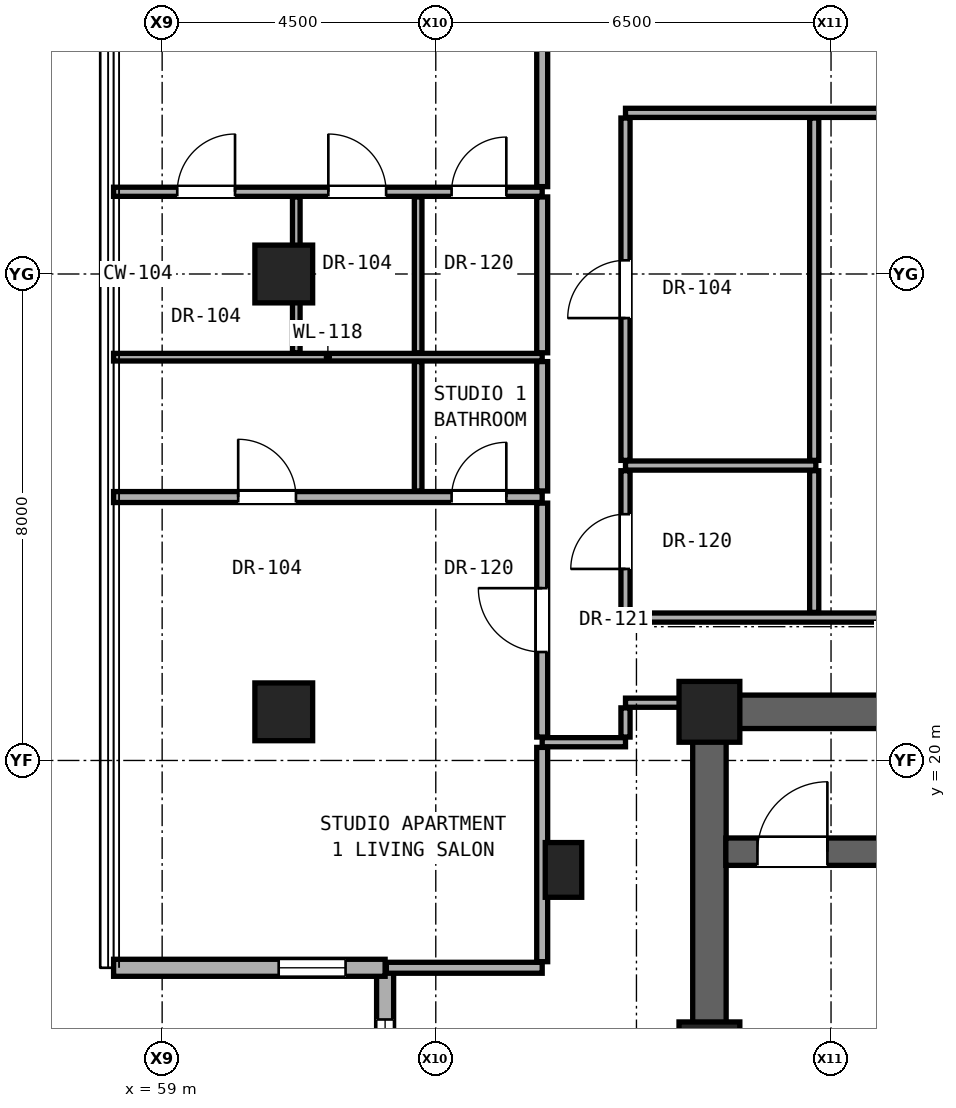
"""IFC4 building model, lengths in metres.
Left out: names, types, materials, properties, quantities, classifications, styles, units other than length and angle.
Written with IfcOpenShell. Run it as: python <this file> out.ifc"""

import sys

from ifc_helpers import new_model, si_unit, direction, frame, frame_2d, origin, origin_2d, place, context, subcontext, project, spatial, rectangle, hollow_rectangle, extrude, element, fill, save


model = new_model("IFC4")
c1 = context("Model", 3, precision=1e-05, world=origin(), true_north=direction((0.0, 1.0)))
c2 = subcontext(c1, "Body", "Model", "MODEL_VIEW")
j1 = project(units=[si_unit("LENGTHUNIT", "METRE"), si_unit("PLANEANGLEUNIT", "RADIAN")], contexts=[c1])
p1 = place(None, origin())
s1 = spatial("IfcSite", under=j1, at=p1, CompositionType="ELEMENT")
p2 = place(p1, origin())
s2 = spatial("IfcBuilding", under=s1, at=p2, CompositionType="ELEMENT")
p3 = place(p2, frame((0.0, 0.0, 177.15)))
s3 = spatial("IfcBuildingStorey", under=s2, at=p3, CompositionType="ELEMENT", Elevation=177.15)
for number, where, z_axis, x_axis in (
    (1, (68.0, 15.2, 0.0), (0.0, 0.0, 1.0), (1.0, 0.0, 0.0)),
    (2, (68.0, 20.8, 0.0), (0.0, 0.0, 1.0), (1.0, 0.0, 0.0)),
):
    element("IfcColumn", number, at=place(p3, frame(where, z_axis=z_axis, x_axis=x_axis)), inside=s3, PredefinedType="COLUMN", context=c2, shape_type="SweptSolid", body=[
        extrude(rectangle(XDim=1.0, YDim=1.0, at=origin_2d()), origin(), (0.0, 0.0, 1.0), 3.25),
    ])
for number, where, z_axis, x_axis in (
    (3, (61.0, 20.8, 0.0), (0.0, 0.0, 1.0), (1.0, 0.0, 0.0)),
    (4, (61.0, 28.0, 0.0), (0.0, 0.0, 1.0), (1.0, 0.0, 0.0)),
):
    element("IfcColumn", number, at=place(p3, frame(where, z_axis=z_axis, x_axis=x_axis)), inside=s3, PredefinedType="COLUMN", context=c2, shape_type="SweptSolid", body=[
        extrude(hollow_rectangle(XDim=0.95, YDim=0.95, WallThickness=0.05, at=origin_2d()), origin(), (0.0, 0.0, 1.0), 3.25),
    ])
p4 = place(p3, frame((65.6, 18.2, 0.0), z_axis=(0.0, 0.0, 1.0), x_axis=(1.0, 0.0, 0.0)))
e5 = element("IfcColumn", 5, at=p4, inside=s3, PredefinedType="PILASTER", context=c2, shape_type="SweptSolid", body=[
    extrude(rectangle(XDim=0.6, YDim=0.9, at=origin_2d()), origin(), (0.0, 0.0, 1.0), 3.25),
])
p5 = place(p3, frame((68.0, 15.2, 0.0), z_axis=(0.0, 0.0, 1.0), x_axis=(0.0, 1.0, 0.0)))
e6 = element("IfcWall", 6, at=p5, inside=s3, PredefinedType="SHEAR", context=c2, shape_type="SweptSolid", body=[
    extrude(rectangle(XDim=5.6, YDim=0.55, at=frame_2d((2.8, 0.0))), origin(), (0.0, 0.0, 1.0), 3.05),
])
p6 = place(p3, frame((68.0, 20.8, 0.0), z_axis=(0.0, 0.0, 1.0), x_axis=(1.0, 0.0, 0.0)))
e7 = element("IfcWall", 7, at=p6, inside=s3, PredefinedType="SHEAR", context=c2, shape_type="SweptSolid", body=[
    extrude(rectangle(XDim=17.0, YDim=0.55, at=frame_2d((8.5, 0.0))), origin(), (0.0, 0.0, 1.0), 3.05),
])
p7 = place(p6, frame((9.55, 0.0, 0.0)))
e8 = element("IfcOpeningElement", 8, at=p7, cuts=e7, PredefinedType="OPENING", context=c2, shape_type="SweptSolid", body=[
    extrude(rectangle(XDim=1.3, YDim=2.3, at=frame_2d((0.65, 1.15))), frame((0.0, 0.285, 0.0), z_axis=(0.0, -1.0, 0.0), x_axis=(1.0, 0.0, 0.0)), (0.0, 0.0, 1.0), 0.57),
])
p8 = place(p6, frame((12.05, 0.0, 0.0)))
e9 = element("IfcOpeningElement", 9, at=p8, cuts=e7, PredefinedType="OPENING", context=c2, shape_type="SweptSolid", body=[
    extrude(rectangle(XDim=1.3, YDim=2.3, at=frame_2d((0.65, 1.15))), frame((0.0, 0.285, 0.0), z_axis=(0.0, -1.0, 0.0), x_axis=(1.0, 0.0, 0.0)), (0.0, 0.0, 1.0), 0.57),
])
p9 = place(p3, frame((62.667, 16.591, 0.0), z_axis=(0.0, 0.0, 1.0), x_axis=(0.0, -1.0, 0.0)))
e10 = element("IfcWall", 10, at=p9, inside=s3, PredefinedType="SOLIDWALL", context=c2, shape_type="SweptSolid", body=[
    extrude(rectangle(XDim=4.465, YDim=0.28, at=frame_2d((2.232, 0.0))), origin(), (0.0, 0.0, 1.0), 3.03),
])
p10 = place(p9, frame((0.85, 0.0, 0.68)))
e11 = element("IfcOpeningElement", 11, at=p10, cuts=e10, PredefinedType="OPENING", context=c2, shape_type="SweptSolid", body=[
    extrude(rectangle(XDim=1.35, YDim=2.2, at=frame_2d((0.675, 1.1))), frame((0.0, 0.15, 0.0), z_axis=(0.0, -1.0, 0.0), x_axis=(1.0, 0.0, 0.0)), (0.0, 0.0, 1.0), 0.3),
])
p11 = place(p3, frame((58.201, 16.591, 0.0), z_axis=(0.0, 0.0, 1.0), x_axis=(1.0, 0.0, 0.0)))
e12 = element("IfcWall", 12, at=p11, inside=s3, PredefinedType="SOLIDWALL", context=c2, shape_type="SweptSolid", body=[
    extrude(rectangle(XDim=4.465, YDim=0.28, at=frame_2d((2.233, 0.0))), origin(), (0.0, 0.0, 1.0), 3.03),
])
p12 = place(p11, frame((2.715, 0.0, 0.85)))
e13 = element("IfcOpeningElement", 13, at=p12, cuts=e12, PredefinedType="OPENING", context=c2, shape_type="SweptSolid", body=[
    extrude(rectangle(XDim=1.1, YDim=2.0, at=frame_2d((0.55, 1.0))), frame((0.0, 0.15, 0.0), z_axis=(0.0, -1.0, 0.0), x_axis=(1.0, 0.0, 0.0)), (0.0, 0.0, 1.0), 0.3),
])
p13 = place(p3, frame((62.687, 16.591, 0.0), z_axis=(0.0, 0.0, 1.0), x_axis=(1.0, 0.0, 0.0)))
e14 = element("IfcWall", 14, at=p13, inside=s3, PredefinedType="PARTITIONING", context=c2, shape_type="SweptSolid", body=[
    extrude(rectangle(XDim=2.563, YDim=0.18, at=frame_2d((1.282, 0.0))), origin(), (0.0, 0.0, 1.0), 3.05),
])
p14 = place(p3, frame((68.27, 18.5, 0.0), z_axis=(0.0, 0.0, 1.0), x_axis=(1.0, 0.0, 0.0)))
e15 = element("IfcWall", 15, at=p14, inside=s3, PredefinedType="SHEAR", context=c2, shape_type="SweptSolid", body=[
    extrude(rectangle(XDim=8.95, YDim=0.45, at=frame_2d((4.475, 0.0))), origin(), (0.0, 0.0, 1.0), 3.05),
])
p15 = place(p14, frame((0.52, 0.0, 0.0)))
e16 = element("IfcOpeningElement", 16, at=p15, cuts=e15, PredefinedType="OPENING", context=c2, shape_type="SweptSolid", body=[
    extrude(rectangle(XDim=1.15, YDim=2.2, at=frame_2d((0.575, 1.1))), frame((0.0, 0.235, 0.0), z_axis=(0.0, -1.0, 0.0), x_axis=(1.0, 0.0, 0.0)), (0.0, 0.0, 1.0), 0.47),
])
p16 = place(p3, frame((65.25, 20.3, 0.0), z_axis=(0.0, 0.0, 1.0), x_axis=(1.0, 0.0, 0.0)))
e17 = element("IfcWall", 17, at=p16, inside=s3, PredefinedType="PARTITIONING", context=c2, shape_type="SweptSolid", body=[
    extrude(rectangle(XDim=1.37, YDim=0.15, at=frame_2d((0.685, 0.0))), origin(), (0.0, 0.0, 1.0), 3.05),
])
p17 = place(p3, frame((66.62, 20.95, 0.0), z_axis=(0.0, 0.0, 1.0), x_axis=(1.0, 0.0, 0.0)))
e18 = element("IfcWall", 18, at=p17, inside=s3, PredefinedType="PARTITIONING", context=c2, shape_type="SweptSolid", body=[
    extrude(rectangle(XDim=1.11, YDim=0.15, at=frame_2d((0.555, 0.0))), origin(), (0.0, 0.0, 1.0), 2.442),
])
p18 = place(p3, frame((66.62, 22.35, 0.0), z_axis=(0.0, 0.0, 1.0), x_axis=(1.0, 0.0, 0.0)))
e19 = element("IfcWall", 19, at=p18, inside=s3, PredefinedType="PARTITIONING", context=c2, shape_type="SweptSolid", body=[
    extrude(rectangle(XDim=10.14, YDim=0.15, at=frame_2d((5.07, 0.0))), origin(), (0.0, 0.0, 1.0), 2.186),
])
p19 = place(p3, frame((58.201, 24.332, 0.0), z_axis=(0.0, 0.0, 1.0), x_axis=(1.0, 0.0, 0.0)))
e20 = element("IfcWall", 20, at=p19, inside=s3, PredefinedType="PARTITIONING", context=c2, shape_type="SweptSolid", body=[
    extrude(rectangle(XDim=7.049, YDim=0.18, at=frame_2d((3.524, 0.0))), origin(), (0.0, 0.0, 1.0), 2.269),
])
p20 = place(p19, frame((2.05, 0.0, 0.0)))
e21 = element("IfcOpeningElement", 21, at=p20, cuts=e20, PredefinedType="OPENING", context=c2, shape_type="SweptSolid", body=[
    extrude(rectangle(XDim=0.95, YDim=2.15, at=frame_2d((0.475, 1.075))), frame((0.0, 0.1, 0.0), z_axis=(0.0, -1.0, 0.0), x_axis=(1.0, 0.0, 0.0)), (0.0, 0.0, 1.0), 0.2),
])
p21 = place(p19, frame((5.559, 0.0, 0.0)))
e22 = element("IfcOpeningElement", 22, at=p21, cuts=e20, PredefinedType="OPENING", context=c2, shape_type="SweptSolid", body=[
    extrude(rectangle(XDim=0.9, YDim=2.1, at=frame_2d((0.45, 1.05))), frame((0.0, 0.1, 0.0), z_axis=(0.0, -1.0, 0.0), x_axis=(1.0, 0.0, 0.0)), (0.0, 0.0, 1.0), 0.2),
])
p22 = place(p3, frame((66.62, 24.85, 0.0), z_axis=(0.0, 0.0, 1.0), x_axis=(1.0, 0.0, 0.0)))
e23 = element("IfcWall", 23, at=p22, inside=s3, PredefinedType="PARTITIONING", context=c2, shape_type="SweptSolid", body=[
    extrude(rectangle(XDim=3.13, YDim=0.15, at=frame_2d((1.565, 0.0))), origin(), (0.0, 0.0, 1.0), 2.186),
])
p23 = place(p3, frame((58.201, 26.632, 0.0), z_axis=(0.0, 0.0, 1.0), x_axis=(1.0, 0.0, 0.0)))
e24 = element("IfcWall", 24, at=p23, inside=s3, PredefinedType="PARTITIONING", context=c2, shape_type="SweptSolid", body=[
    extrude(rectangle(XDim=7.049, YDim=0.125, at=frame_2d((3.524, 0.0))), origin(), (0.0, 0.0, 1.0), 2.269),
])
p24 = place(p3, frame((58.201, 29.352, 0.0), z_axis=(0.0, 0.0, 1.0), x_axis=(1.0, 0.0, 0.0)))
e25 = element("IfcWall", 25, at=p24, inside=s3, PredefinedType="PARTITIONING", context=c2, shape_type="SweptSolid", body=[
    extrude(rectangle(XDim=7.049, YDim=0.15, at=frame_2d((3.524, 0.0))), origin(), (0.0, 0.0, 1.0), 2.269),
])
p25 = place(p24, frame((1.048, 0.0, 0.0)))
e26 = element("IfcOpeningElement", 26, at=p25, cuts=e25, PredefinedType="OPENING", context=c2, shape_type="SweptSolid", body=[
    extrude(rectangle(XDim=0.95, YDim=2.15, at=frame_2d((0.475, 1.075))), frame((0.0, 0.085, 0.0), z_axis=(0.0, -1.0, 0.0), x_axis=(1.0, 0.0, 0.0)), (0.0, 0.0, 1.0), 0.17),
])
p26 = place(p24, frame((3.532, 0.0, 0.0)))
e27 = element("IfcOpeningElement", 27, at=p26, cuts=e25, PredefinedType="OPENING", context=c2, shape_type="SweptSolid", body=[
    extrude(rectangle(XDim=0.95, YDim=2.15, at=frame_2d((0.475, 1.075))), frame((0.0, 0.085, 0.0), z_axis=(0.0, -1.0, 0.0), x_axis=(1.0, 0.0, 0.0)), (0.0, 0.0, 1.0), 0.17),
])
p27 = place(p24, frame((5.559, 0.0, 0.0)))
e28 = element("IfcOpeningElement", 28, at=p27, cuts=e25, PredefinedType="OPENING", context=c2, shape_type="SweptSolid", body=[
    extrude(rectangle(XDim=0.9, YDim=2.1, at=frame_2d((0.45, 1.05))), frame((0.0, 0.085, 0.0), z_axis=(0.0, -1.0, 0.0), x_axis=(1.0, 0.0, 0.0)), (0.0, 0.0, 1.0), 0.17),
])
p28 = place(p3, frame((66.62, 30.65, 0.0), z_axis=(0.0, 0.0, 1.0), x_axis=(1.0, 0.0, 0.0)))
e29 = element("IfcWall", 29, at=p28, inside=s3, PredefinedType="PARTITIONING", context=c2, shape_type="SweptSolid", body=[
    extrude(rectangle(XDim=10.14, YDim=0.15, at=frame_2d((5.07, 0.0))), origin(), (0.0, 0.0, 1.0), 2.186),
])
p29 = place(p28, frame((6.14, 0.0, 0.0)))
e30 = element("IfcOpeningElement", 30, at=p29, cuts=e29, PredefinedType="OPENING", context=c2, shape_type="SweptSolid", body=[
    extrude(rectangle(XDim=0.95, YDim=2.15, at=frame_2d((0.475, 1.075))), frame((0.0, 0.085, 0.0), z_axis=(0.0, -1.0, 0.0), x_axis=(1.0, 0.0, 0.0)), (0.0, 0.0, 1.0), 0.17),
])
p30 = place(p3, frame((61.206, 26.705, 0.0), z_axis=(0.0, 0.0, 1.0), x_axis=(0.0, 1.0, 0.0)))
e31 = element("IfcWall", 31, at=p30, inside=s3, PredefinedType="PARTITIONING", context=c2, shape_type="SweptSolid", body=[
    extrude(rectangle(XDim=2.562, YDim=0.125, at=frame_2d((1.281, 0.0))), origin(), (0.0, 0.0, 1.0), 2.269),
])
p31 = place(p3, frame((63.21, 24.432, 0.0), z_axis=(0.0, 0.0, 1.0), x_axis=(0.0, 1.0, 0.0)))
e32 = element("IfcWall", 32, at=p31, inside=s3, PredefinedType="PARTITIONING", context=c2, shape_type="SweptSolid", body=[
    extrude(rectangle(XDim=2.128, YDim=0.125, at=frame_2d((1.064, 0.0))), origin(), (0.0, 0.0, 1.0), 3.05),
])
p32 = place(p3, frame((63.21, 26.705, 0.0), z_axis=(0.0, 0.0, 1.0), x_axis=(0.0, 1.0, 0.0)))
e33 = element("IfcWall", 33, at=p32, inside=s3, PredefinedType="PARTITIONING", context=c2, shape_type="SweptSolid", body=[
    extrude(rectangle(XDim=2.562, YDim=0.125, at=frame_2d((1.281, 0.0))), origin(), (0.0, 0.0, 1.0), 2.346),
])
p33 = place(p3, frame((65.25, 16.691, 0.0), z_axis=(0.0, 0.0, 1.0), x_axis=(0.0, 1.0, 0.0)))
e34 = element("IfcWall", 34, at=p33, inside=s3, PredefinedType="PARTITIONING", context=c2, shape_type="SweptSolid", body=[
    extrude(rectangle(XDim=3.524, YDim=0.18, at=frame_2d((1.762, 0.0))), origin(), (0.0, 0.0, 1.0), 2.493),
])
p34 = place(p3, frame((65.25, 20.385, 0.0), z_axis=(0.0, 0.0, 1.0), x_axis=(0.0, 1.0, 0.0)))
e35 = element("IfcWall", 35, at=p34, inside=s3, PredefinedType="PARTITIONING", context=c2, shape_type="SweptSolid", body=[
    extrude(rectangle(XDim=3.847, YDim=0.18, at=frame_2d((1.923, 0.0))), origin(), (0.0, 0.0, 1.0), 2.442),
])
p35 = place(p34, frame((1.398, 0.0, 0.0)))
e36 = element("IfcOpeningElement", 36, at=p35, cuts=e35, PredefinedType="OPENING", context=c2, shape_type="SweptSolid", body=[
    extrude(rectangle(XDim=1.05, YDim=2.2, at=frame_2d((0.525, 1.1))), frame((0.0, 0.1, 0.0), z_axis=(0.0, -1.0, 0.0), x_axis=(1.0, 0.0, 0.0)), (0.0, 0.0, 1.0), 0.2),
])
p36 = place(p3, frame((65.25, 24.432, 0.0), z_axis=(0.0, 0.0, 1.0), x_axis=(0.0, 1.0, 0.0)))
e37 = element("IfcWall", 37, at=p36, inside=s3, PredefinedType="PARTITIONING", context=c2, shape_type="SweptSolid", body=[
    extrude(rectangle(XDim=2.128, YDim=0.18, at=frame_2d((1.064, 0.0))), origin(), (0.0, 0.0, 1.0), 3.05),
])
p37 = place(p3, frame((65.25, 26.705, 0.0), z_axis=(0.0, 0.0, 1.0), x_axis=(0.0, 1.0, 0.0)))
e38 = element("IfcWall", 38, at=p37, inside=s3, PredefinedType="PARTITIONING", context=c2, shape_type="SweptSolid", body=[
    extrude(rectangle(XDim=2.562, YDim=0.18, at=frame_2d((1.281, 0.0))), origin(), (0.0, 0.0, 1.0), 2.346),
])
p38 = place(p3, frame((65.25, 29.437, 0.0), z_axis=(0.0, 0.0, 1.0), x_axis=(0.0, 1.0, 0.0)))
e39 = element("IfcWall", 39, at=p38, inside=s3, PredefinedType="PARTITIONING", context=c2, shape_type="SweptSolid", body=[
    extrude(rectangle(XDim=6.178, YDim=0.18, at=frame_2d((3.089, 0.0))), origin(), (0.0, 0.0, 1.0), 2.442),
])
p39 = place(p38, frame((2.564, 0.0, 0.0)))
e40 = element("IfcOpeningElement", 40, at=p39, cuts=e39, PredefinedType="OPENING", context=c2, shape_type="SweptSolid", body=[
    extrude(rectangle(XDim=1.05, YDim=2.2, at=frame_2d((0.525, 1.1))), frame((0.0, 0.1, 0.0), z_axis=(0.0, -1.0, 0.0), x_axis=(1.0, 0.0, 0.0)), (0.0, 0.0, 1.0), 0.2),
])
p40 = place(p3, frame((66.62, 20.385, 0.0), z_axis=(0.0, 0.0, 1.0), x_axis=(0.0, 1.0, 0.0)))
e41 = element("IfcWall", 41, at=p40, inside=s3, PredefinedType="PARTITIONING", context=c2, shape_type="SweptSolid", body=[
    extrude(rectangle(XDim=0.48, YDim=0.15, at=frame_2d((0.24, 0.0))), origin(), (0.0, 0.0, 1.0), 2.442),
])
p41 = place(p3, frame((66.62, 22.435, 0.0), z_axis=(0.0, 0.0, 1.0), x_axis=(0.0, 1.0, 0.0)))
e42 = element("IfcWall", 42, at=p41, inside=s3, PredefinedType="PARTITIONING", context=c2, shape_type="SweptSolid", body=[
    extrude(rectangle(XDim=2.33, YDim=0.15, at=frame_2d((1.165, 0.0))), origin(), (0.0, 0.0, 1.0), 3.05),
])
p42 = place(p41, frame((0.715, 0.0, 0.0)))
e43 = element("IfcOpeningElement", 43, at=p42, cuts=e42, PredefinedType="OPENING", context=c2, shape_type="SweptSolid", body=[
    extrude(rectangle(XDim=0.9, YDim=2.1, at=frame_2d((0.45, 1.05))), frame((0.0, 0.085, 0.0), z_axis=(0.0, -1.0, 0.0), x_axis=(1.0, 0.0, 0.0)), (0.0, 0.0, 1.0), 0.17),
])
p43 = place(p3, frame((66.62, 24.935, 0.0), z_axis=(0.0, 0.0, 1.0), x_axis=(0.0, 1.0, 0.0)))
e44 = element("IfcWall", 44, at=p43, inside=s3, PredefinedType="PARTITIONING", context=c2, shape_type="SweptSolid", body=[
    extrude(rectangle(XDim=5.63, YDim=0.15, at=frame_2d((2.815, 0.0))), origin(), (0.0, 0.0, 1.0), 2.346),
])
p44 = place(p43, frame((2.34, 0.0, 0.0)))
e45 = element("IfcOpeningElement", 45, at=p44, cuts=e44, PredefinedType="OPENING", context=c2, shape_type="SweptSolid", body=[
    extrude(rectangle(XDim=0.95, YDim=2.15, at=frame_2d((0.475, 1.075))), frame((0.0, 0.085, 0.0), z_axis=(0.0, -1.0, 0.0), x_axis=(1.0, 0.0, 0.0)), (0.0, 0.0, 1.0), 0.17),
])
p45 = place(p3, frame((69.723, 22.435, 0.0), z_axis=(0.0, 0.0, 1.0), x_axis=(0.0, 1.0, 0.0)))
e46 = element("IfcWall", 46, at=p45, inside=s3, PredefinedType="PARTITIONING", context=c2, shape_type="SweptSolid", body=[
    extrude(rectangle(XDim=2.33, YDim=0.15, at=frame_2d((1.165, 0.0))), origin(), (0.0, 0.0, 1.0), 3.05),
])
p46 = place(p3, frame((69.723, 24.935, 0.0), z_axis=(0.0, 0.0, 1.0), x_axis=(0.0, 1.0, 0.0)))
e47 = element("IfcWall", 47, at=p46, inside=s3, PredefinedType="PARTITIONING", context=c2, shape_type="SweptSolid", body=[
    extrude(rectangle(XDim=5.63, YDim=0.15, at=frame_2d((2.815, 0.0))), origin(), (0.0, 0.0, 1.0), 2.186),
])
p47 = place(p10, origin())
e48 = element("IfcWindow", 48, at=p47, inside=s3, PartitioningType="SINGLE_PANEL", PredefinedType="WINDOW", context=c2, shape_type="SweptSolid", body=[
    extrude(rectangle(XDim=1.35, YDim=2.2, at=frame_2d((0.675, 1.1))), frame((0.0, 0.03, 0.0), z_axis=(0.0, -1.0, 0.0), x_axis=(1.0, 0.0, 0.0)), (0.0, 0.0, 1.0), 0.06),
])
fill(e11, e48)
p48 = place(p12, origin())
e49 = element("IfcWindow", 49, at=p48, inside=s3, PartitioningType="SINGLE_PANEL", PredefinedType="WINDOW", context=c2, shape_type="SweptSolid", body=[
    extrude(rectangle(XDim=1.1, YDim=2.0, at=frame_2d((0.55, 1.0))), frame((0.0, 0.03, 0.0), z_axis=(0.0, -1.0, 0.0), x_axis=(1.0, 0.0, 0.0)), (0.0, 0.0, 1.0), 0.06),
])
fill(e13, e49)
p49 = place(p15, origin())
e50 = element("IfcDoor", 50, at=p49, inside=s3, OperationType="SINGLE_SWING_RIGHT", PredefinedType="DOOR", context=c2, shape_type="SweptSolid", body=[
    extrude(rectangle(XDim=1.15, YDim=2.2, at=frame_2d((0.575, 1.1))), frame((0.0, 0.025, 0.0), z_axis=(0.0, -1.0, 0.0), x_axis=(1.0, 0.0, 0.0)), (0.0, 0.0, 1.0), 0.05),
])
fill(e16, e50)
p50 = place(p42, origin())
e51 = element("IfcDoor", 51, at=p50, inside=s3, OperationType="SINGLE_SWING_LEFT", PredefinedType="DOOR", context=c2, shape_type="SweptSolid", body=[
    extrude(rectangle(XDim=0.9, YDim=2.1, at=frame_2d((0.45, 1.05))), frame((0.0, 0.025, 0.0), z_axis=(0.0, -1.0, 0.0), x_axis=(1.0, 0.0, 0.0)), (0.0, 0.0, 1.0), 0.05),
])
fill(e43, e51)
p51 = place(p35, origin())
e52 = element("IfcDoor", 52, at=p51, inside=s3, OperationType="SINGLE_SWING_RIGHT", PredefinedType="DOOR", context=c2, shape_type="SweptSolid", body=[
    extrude(rectangle(XDim=1.05, YDim=2.2, at=frame_2d((0.525, 1.1))), frame((0.0, 0.025, 0.0), z_axis=(0.0, -1.0, 0.0), x_axis=(1.0, 0.0, 0.0)), (0.0, 0.0, 1.0), 0.05),
])
fill(e36, e52)
p52 = place(p20, origin())
e53 = element("IfcDoor", 53, at=p52, inside=s3, OperationType="SINGLE_SWING_LEFT", PredefinedType="DOOR", context=c2, shape_type="SweptSolid", body=[
    extrude(rectangle(XDim=0.95, YDim=2.15, at=frame_2d((0.475, 1.075))), frame((0.0, 0.025, 0.0), z_axis=(0.0, -1.0, 0.0), x_axis=(1.0, 0.0, 0.0)), (0.0, 0.0, 1.0), 0.05),
])
fill(e21, e53)
p53 = place(p21, origin())
e54 = element("IfcDoor", 54, at=p53, inside=s3, OperationType="SINGLE_SWING_RIGHT", PredefinedType="DOOR", context=c2, shape_type="SweptSolid", body=[
    extrude(rectangle(XDim=0.9, YDim=2.1, at=frame_2d((0.45, 1.05))), frame((0.0, 0.025, 0.0), z_axis=(0.0, -1.0, 0.0), x_axis=(1.0, 0.0, 0.0)), (0.0, 0.0, 1.0), 0.05),
])
fill(e22, e54)
p54 = place(p25, origin())
e55 = element("IfcDoor", 55, at=p54, inside=s3, OperationType="SINGLE_SWING_RIGHT", PredefinedType="DOOR", context=c2, shape_type="SweptSolid", body=[
    extrude(rectangle(XDim=0.95, YDim=2.15, at=frame_2d((0.475, 1.075))), frame((0.0, 0.025, 0.0), z_axis=(0.0, -1.0, 0.0), x_axis=(1.0, 0.0, 0.0)), (0.0, 0.0, 1.0), 0.05),
])
fill(e26, e55)
p55 = place(p26, origin())
e56 = element("IfcDoor", 56, at=p55, inside=s3, OperationType="SINGLE_SWING_LEFT", PredefinedType="DOOR", context=c2, shape_type="SweptSolid", body=[
    extrude(rectangle(XDim=0.95, YDim=2.15, at=frame_2d((0.475, 1.075))), frame((0.0, 0.025, 0.0), z_axis=(0.0, -1.0, 0.0), x_axis=(1.0, 0.0, 0.0)), (0.0, 0.0, 1.0), 0.05),
])
fill(e27, e56)
p56 = place(p27, origin())
e57 = element("IfcDoor", 57, at=p56, inside=s3, OperationType="SINGLE_SWING_RIGHT", PredefinedType="DOOR", context=c2, shape_type="SweptSolid", body=[
    extrude(rectangle(XDim=0.9, YDim=2.1, at=frame_2d((0.45, 1.05))), frame((0.0, 0.025, 0.0), z_axis=(0.0, -1.0, 0.0), x_axis=(1.0, 0.0, 0.0)), (0.0, 0.0, 1.0), 0.05),
])
fill(e28, e57)
p57 = place(p44, origin())
e58 = element("IfcDoor", 58, at=p57, inside=s3, OperationType="SINGLE_SWING_LEFT", PredefinedType="DOOR", context=c2, shape_type="SweptSolid", body=[
    extrude(rectangle(XDim=0.95, YDim=2.15, at=frame_2d((0.475, 1.075))), frame((0.0, 0.025, 0.0), z_axis=(0.0, -1.0, 0.0), x_axis=(1.0, 0.0, 0.0)), (0.0, 0.0, 1.0), 0.05),
])
fill(e45, e58)
save(model, sys.argv[1])
